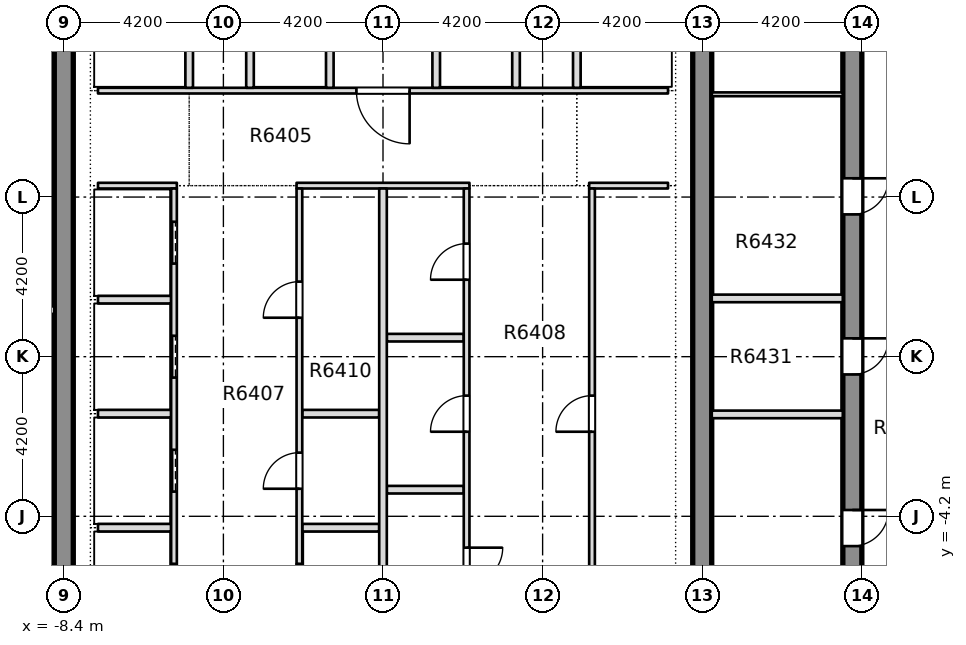
"""IFC4 building model, lengths in metres.
Left out: names, types, materials, properties, quantities, classifications, styles, units other than length and angle.
Written with IfcOpenShell. Run it as: python <this file> out.ifc"""

import sys

from ifc_helpers import new_model, si_unit, direction, frame, frame_2d, origin, place, context, subcontext, project, spatial, rectangle, extrude, element, fill, save


model = new_model("IFC4")
c1 = context("Model", 3, precision=1e-05, world=origin(), true_north=direction((0.0, 1.0)))
c2 = subcontext(c1, "Body", "Model", "MODEL_VIEW")
j1 = project(units=[si_unit("LENGTHUNIT", "METRE"), si_unit("PLANEANGLEUNIT", "RADIAN")], contexts=[c1])
p1 = place(None, origin())
s1 = spatial("IfcSite", under=j1, at=p1, CompositionType="ELEMENT")
p2 = place(p1, origin())
s2 = spatial("IfcBuilding", under=s1, at=p2, CompositionType="ELEMENT")
p3 = place(p2, frame((0.0, 0.0, 244.15)))
s3 = spatial("IfcBuildingStorey", under=s2, at=p3, CompositionType="ELEMENT", Elevation=244.15)
p4 = place(p3, frame((12.35, -8.4, -0.4), z_axis=(0.0, 0.0, 1.0), x_axis=(0.0, 1.0, 0.0)))
e1 = element("IfcWall", 1, at=p4, inside=s3, PredefinedType="SHEAR", context=c2, shape_type="SweptSolid", body=[
    extrude(rectangle(XDim=30.15, YDim=0.5, at=frame_2d((15.075, 0.0))), origin(), (0.0, 0.0, 1.0), 3.45),
])
p5 = place(p4, frame((3.416, 0.0, 0.4)))
e2 = element("IfcOpeningElement", 2, at=p5, cuts=e1, PredefinedType="OPENING", context=c2, shape_type="SweptSolid", body=[
    extrude(rectangle(XDim=0.95, YDim=2.1, at=frame_2d((0.475, 1.05))), frame((0.0, 0.26, 0.0), z_axis=(0.0, -1.0, 0.0), x_axis=(1.0, 0.0, 0.0)), (0.0, 0.0, 1.0), 0.52),
])
p6 = place(p4, frame((7.932, 0.0, 0.4)))
e3 = element("IfcOpeningElement", 3, at=p6, cuts=e1, PredefinedType="OPENING", context=c2, shape_type="SweptSolid", body=[
    extrude(rectangle(XDim=0.95, YDim=2.1, at=frame_2d((0.475, 1.05))), frame((0.0, 0.26, 0.0), z_axis=(0.0, -1.0, 0.0), x_axis=(1.0, 0.0, 0.0)), (0.0, 0.0, 1.0), 0.52),
])
p7 = place(p4, frame((12.144, 0.0, 0.4)))
e4 = element("IfcOpeningElement", 4, at=p7, cuts=e1, PredefinedType="OPENING", context=c2, shape_type="SweptSolid", body=[
    extrude(rectangle(XDim=0.95, YDim=2.1, at=frame_2d((0.475, 1.05))), frame((0.0, 0.26, 0.0), z_axis=(0.0, -1.0, 0.0), x_axis=(1.0, 0.0, 0.0)), (0.0, 0.0, 1.0), 0.52),
])
p8 = place(p4, frame((16.477, 0.0, 0.4)))
e5 = element("IfcOpeningElement", 5, at=p8, cuts=e1, PredefinedType="OPENING", context=c2, shape_type="SweptSolid", body=[
    extrude(rectangle(XDim=0.95, YDim=2.1, at=frame_2d((0.475, 1.05))), frame((0.0, 0.26, 0.0), z_axis=(0.0, -1.0, 0.0), x_axis=(1.0, 0.0, 0.0)), (0.0, 0.0, 1.0), 0.52),
])
p9 = place(p4, frame((23.605, 0.0, 0.4)))
e6 = element("IfcOpeningElement", 6, at=p9, cuts=e1, PredefinedType="OPENING", context=c2, shape_type="SweptSolid", body=[
    extrude(rectangle(XDim=0.95, YDim=2.1, at=frame_2d((0.475, 1.05))), frame((0.0, 0.26, 0.0), z_axis=(0.0, -1.0, 0.0), x_axis=(1.0, 0.0, 0.0)), (0.0, 0.0, 1.0), 0.52),
])
p10 = place(p4, frame((27.63, 0.0, 0.4)))
e7 = element("IfcOpeningElement", 7, at=p10, cuts=e1, PredefinedType="OPENING", context=c2, shape_type="SweptSolid", body=[
    extrude(rectangle(XDim=0.95, YDim=2.1, at=frame_2d((0.475, 1.05))), frame((0.0, 0.26, 0.0), z_axis=(0.0, -1.0, 0.0), x_axis=(1.0, 0.0, 0.0)), (0.0, 0.0, 1.0), 0.52),
])
p11 = place(p4, frame((19.3, 0.0, 0.4)))
e8 = element("IfcOpeningElement", 8, at=p11, cuts=e1, PredefinedType="OPENING", context=c2, shape_type="SweptSolid", body=[
    extrude(rectangle(XDim=1.2, YDim=2.1, at=frame_2d((0.6, 1.05))), frame((0.0, 0.26, 0.0), z_axis=(0.0, -1.0, 0.0), x_axis=(1.0, 0.0, 0.0)), (0.0, 0.0, 1.0), 0.52),
])
p12 = place(p3, frame((-8.4, -7.9, -0.4), z_axis=(0.0, 0.0, 1.0), x_axis=(0.0, 1.0, 0.0)))
e9 = element("IfcWall", 9, at=p12, inside=s3, PredefinedType="SHEAR", context=c2, shape_type="SweptSolid", body=[
    extrude(rectangle(XDim=29.15, YDim=0.5, at=frame_2d((14.575, 0.0))), origin(), (0.0, 0.0, 1.0), 3.45),
])
p13 = place(p12, frame((18.8, 0.0, 0.4)))
e10 = element("IfcOpeningElement", 10, at=p13, cuts=e9, PredefinedType="OPENING", context=c2, shape_type="SweptSolid", body=[
    extrude(rectangle(XDim=1.2, YDim=2.1, at=frame_2d((0.6, 1.05))), frame((0.0, 0.26, 0.0), z_axis=(0.0, -1.0, 0.0), x_axis=(1.0, 0.0, 0.0)), (0.0, 0.0, 1.0), 0.52),
])
p14 = place(p3, frame((8.4, -7.9, -0.4), z_axis=(0.0, 0.0, 1.0), x_axis=(0.0, 1.0, 0.0)))
e11 = element("IfcWall", 11, at=p14, inside=s3, PredefinedType="SHEAR", context=c2, shape_type="SweptSolid", body=[
    extrude(rectangle(XDim=29.15, YDim=0.5, at=frame_2d((14.575, 0.0))), origin(), (0.0, 0.0, 1.0), 3.45),
])
p15 = place(p14, frame((18.8, 0.0, 0.4)))
e12 = element("IfcOpeningElement", 12, at=p15, cuts=e11, PredefinedType="OPENING", context=c2, shape_type="SweptSolid", body=[
    extrude(rectangle(XDim=1.2, YDim=2.1, at=frame_2d((0.6, 1.05))), frame((0.0, 0.26, 0.0), z_axis=(0.0, -1.0, 0.0), x_axis=(1.0, 0.0, 0.0)), (0.0, 0.0, 1.0), 0.52),
])
p16 = place(p3, frame((-7.5, -4.5, 0.0), z_axis=(0.0, 0.0, 1.0), x_axis=(1.0, 0.0, 0.0)))
e13 = element("IfcWall", 13, at=p16, inside=s3, PredefinedType="PARTITIONING", context=c2, shape_type="SweptSolid", body=[
    extrude(rectangle(XDim=1.925, YDim=0.2, at=frame_2d((0.962, 0.0))), origin(), (0.0, 0.0, 1.0), 3.05),
])
for number, where, z_axis, x_axis in (
    (14, (-2.125, -4.5, 0.0), (0.0, 0.0, 1.0), (1.0, 0.0, 0.0)),
    (15, (0.1, -3.5, 0.0), (0.0, 0.0, 1.0), (1.0, 0.0, 0.0)),
):
    element("IfcWall", number, at=place(p3, frame(where, z_axis=z_axis, x_axis=x_axis)), inside=s3, PredefinedType="PARTITIONING", context=c2, shape_type="SweptSolid", body=[
        extrude(rectangle(XDim=2.025, YDim=0.2, at=frame_2d((1.012, 0.0))), origin(), (0.0, 0.0, 1.0), 3.05),
    ])
p17 = place(p3, frame((-7.5, -1.5, 0.0), z_axis=(0.0, 0.0, 1.0), x_axis=(1.0, 0.0, 0.0)))
e16 = element("IfcWall", 16, at=p17, inside=s3, PredefinedType="PARTITIONING", context=c2, shape_type="SweptSolid", body=[
    extrude(rectangle(XDim=1.925, YDim=0.2, at=frame_2d((0.962, 0.0))), origin(), (0.0, 0.0, 1.0), 3.05),
])
for number, where, z_axis, x_axis in (
    (17, (-2.125, -1.5, 0.0), (0.0, 0.0, 1.0), (1.0, 0.0, 0.0)),
    (18, (0.1, 0.5, 0.0), (0.0, 0.0, 1.0), (1.0, 0.0, 0.0)),
):
    element("IfcWall", number, at=place(p3, frame(where, z_axis=z_axis, x_axis=x_axis)), inside=s3, PredefinedType="PARTITIONING", context=c2, shape_type="SweptSolid", body=[
        extrude(rectangle(XDim=2.025, YDim=0.2, at=frame_2d((1.012, 0.0))), origin(), (0.0, 0.0, 1.0), 3.05),
    ])
p18 = place(p3, frame((-7.5, 1.5, 0.0), z_axis=(0.0, 0.0, 1.0), x_axis=(1.0, 0.0, 0.0)))
e19 = element("IfcWall", 19, at=p18, inside=s3, PredefinedType="PARTITIONING", context=c2, shape_type="SweptSolid", body=[
    extrude(rectangle(XDim=1.925, YDim=0.2, at=frame_2d((0.962, 0.0))), origin(), (0.0, 0.0, 1.0), 3.05),
])
p19 = place(p3, frame((-7.5, 4.5, 0.0), z_axis=(0.0, 0.0, 1.0), x_axis=(1.0, 0.0, 0.0)))
e20 = element("IfcWall", 20, at=p19, inside=s3, PredefinedType="PARTITIONING", context=c2, shape_type="SweptSolid", body=[
    extrude(rectangle(XDim=2.075, YDim=0.15, at=frame_2d((1.038, 0.0))), origin(), (0.0, 0.0, 1.0), 3.05),
])
p20 = place(p3, frame((-2.275, 4.5, 0.0), z_axis=(0.0, 0.0, 1.0), x_axis=(1.0, 0.0, 0.0)))
e21 = element("IfcWall", 21, at=p20, inside=s3, PredefinedType="PARTITIONING", context=c2, shape_type="SweptSolid", body=[
    extrude(rectangle(XDim=4.55, YDim=0.15, at=frame_2d((2.275, 0.0))), origin(), (0.0, 0.0, 1.0), 3.05),
])
p21 = place(p3, frame((5.425, 4.5, 0.0), z_axis=(0.0, 0.0, 1.0), x_axis=(1.0, 0.0, 0.0)))
e22 = element("IfcWall", 22, at=p21, inside=s3, PredefinedType="PARTITIONING", context=c2, shape_type="SweptSolid", body=[
    extrude(rectangle(XDim=2.075, YDim=0.15, at=frame_2d((1.038, 0.0))), origin(), (0.0, 0.0, 1.0), 3.05),
])
p22 = place(p3, frame((-7.5, 7.0, 0.0), z_axis=(0.0, 0.0, 1.0), x_axis=(1.0, 0.0, 0.0)))
e23 = element("IfcWall", 23, at=p22, inside=s3, PredefinedType="PARTITIONING", context=c2, shape_type="SweptSolid", body=[
    extrude(rectangle(XDim=15.0, YDim=0.15, at=frame_2d((7.5, 0.0))), origin(), (0.0, 0.0, 1.0), 3.05),
])
p23 = place(p22, frame((6.8, 0.0, 0.0)))
e24 = element("IfcOpeningElement", 24, at=p23, cuts=e23, PredefinedType="OPENING", context=c2, shape_type="SweptSolid", body=[
    extrude(rectangle(XDim=1.4, YDim=2.1, at=frame_2d((0.7, 1.05))), frame((0.0, 0.085, 0.0), z_axis=(0.0, -1.0, 0.0), x_axis=(1.0, 0.0, 0.0)), (0.0, 0.0, 1.0), 0.17),
])
p24 = place(p3, frame((-5.5, -7.899, 0.0), z_axis=(0.0, 0.0, 1.0), x_axis=(0.0, 1.0, 0.0)))
e25 = element("IfcWall", 25, at=p24, inside=s3, PredefinedType="PARTITIONING", context=c2, shape_type="SweptSolid", body=[
    extrude(rectangle(XDim=12.324, YDim=0.15, at=frame_2d((6.162, 0.0))), origin(), (0.0, 0.0, 1.0), 3.05),
])
p25 = place(p24, frame((1.349, 0.0, 0.0)))
e26 = element("IfcOpeningElement", 26, at=p25, cuts=e25, PredefinedType="OPENING", context=c2, shape_type="SweptSolid", body=[
    extrude(rectangle(XDim=1.1, YDim=2.1, at=frame_2d((0.55, 1.05))), frame((0.0, 0.085, 0.0), z_axis=(0.0, -1.0, 0.0), x_axis=(1.0, 0.0, 0.0)), (0.0, 0.0, 1.0), 0.17),
])
p26 = place(p24, frame((4.349, 0.0, 0.0)))
e27 = element("IfcOpeningElement", 27, at=p26, cuts=e25, PredefinedType="OPENING", context=c2, shape_type="SweptSolid", body=[
    extrude(rectangle(XDim=1.1, YDim=2.1, at=frame_2d((0.55, 1.05))), frame((0.0, 0.085, 0.0), z_axis=(0.0, -1.0, 0.0), x_axis=(1.0, 0.0, 0.0)), (0.0, 0.0, 1.0), 0.17),
])
p27 = place(p24, frame((7.349, 0.0, 0.0)))
e28 = element("IfcOpeningElement", 28, at=p27, cuts=e25, PredefinedType="OPENING", context=c2, shape_type="SweptSolid", body=[
    extrude(rectangle(XDim=1.1, YDim=2.1, at=frame_2d((0.55, 1.05))), frame((0.0, 0.085, 0.0), z_axis=(0.0, -1.0, 0.0), x_axis=(1.0, 0.0, 0.0)), (0.0, 0.0, 1.0), 0.17),
])
p28 = place(p24, frame((10.349, 0.0, 0.0)))
e29 = element("IfcOpeningElement", 29, at=p28, cuts=e25, PredefinedType="OPENING", context=c2, shape_type="SweptSolid", body=[
    extrude(rectangle(XDim=1.1, YDim=2.1, at=frame_2d((0.55, 1.05))), frame((0.0, 0.085, 0.0), z_axis=(0.0, -1.0, 0.0), x_axis=(1.0, 0.0, 0.0)), (0.0, 0.0, 1.0), 0.17),
])
p29 = place(p3, frame((-5.1, 7.075, 0.0), z_axis=(0.0, 0.0, 1.0), x_axis=(0.0, 1.0, 0.0)))
e30 = element("IfcWall", 30, at=p29, inside=s3, PredefinedType="PARTITIONING", context=c2, shape_type="SweptSolid", body=[
    extrude(rectangle(XDim=2.725, YDim=0.2, at=frame_2d((1.363, 0.0))), origin(), (0.0, 0.0, 1.0), 3.05),
])
p30 = place(p3, frame((-3.5, 7.075, 0.0), z_axis=(0.0, 0.0, 1.0), x_axis=(0.0, 1.0, 0.0)))
e31 = element("IfcWall", 31, at=p30, inside=s3, PredefinedType="PARTITIONING", context=c2, shape_type="SweptSolid", body=[
    extrude(rectangle(XDim=2.85, YDim=0.2, at=frame_2d((1.425, 0.0))), origin(), (0.0, 0.0, 1.0), 3.05),
])
p31 = place(p3, frame((-2.2, -7.899, 0.0), z_axis=(0.0, 0.0, 1.0), x_axis=(0.0, 1.0, 0.0)))
e32 = element("IfcWall", 32, at=p31, inside=s3, PredefinedType="PARTITIONING", context=c2, shape_type="SweptSolid", body=[
    extrude(rectangle(XDim=12.324, YDim=0.15, at=frame_2d((6.162, 0.0))), origin(), (0.0, 0.0, 1.0), 3.05),
])
p32 = place(p31, frame((1.349, 0.0, 0.0)))
e33 = element("IfcOpeningElement", 33, at=p32, cuts=e32, PredefinedType="OPENING", context=c2, shape_type="SweptSolid", body=[
    extrude(rectangle(XDim=1.1, YDim=2.1, at=frame_2d((0.55, 1.05))), frame((0.0, 0.085, 0.0), z_axis=(0.0, -1.0, 0.0), x_axis=(1.0, 0.0, 0.0)), (0.0, 0.0, 1.0), 0.17),
])
p33 = place(p31, frame((4.424, 0.0, 0.0)))
e34 = element("IfcOpeningElement", 34, at=p33, cuts=e32, PredefinedType="OPENING", context=c2, shape_type="SweptSolid", body=[
    extrude(rectangle(XDim=0.95, YDim=2.1, at=frame_2d((0.475, 1.05))), frame((0.0, 0.085, 0.0), z_axis=(0.0, -1.0, 0.0), x_axis=(1.0, 0.0, 0.0)), (0.0, 0.0, 1.0), 0.17),
])
p34 = place(p31, frame((8.924, 0.0, 0.0)))
e35 = element("IfcOpeningElement", 35, at=p34, cuts=e32, PredefinedType="OPENING", context=c2, shape_type="SweptSolid", body=[
    extrude(rectangle(XDim=0.95, YDim=2.1, at=frame_2d((0.475, 1.05))), frame((0.0, 0.085, 0.0), z_axis=(0.0, -1.0, 0.0), x_axis=(1.0, 0.0, 0.0)), (0.0, 0.0, 1.0), 0.17),
])
p35 = place(p3, frame((-1.4, 7.075, 0.0), z_axis=(0.0, 0.0, 1.0), x_axis=(0.0, 1.0, 0.0)))
e36 = element("IfcWall", 36, at=p35, inside=s3, PredefinedType="PARTITIONING", context=c2, shape_type="SweptSolid", body=[
    extrude(rectangle(XDim=2.85, YDim=0.2, at=frame_2d((1.425, 0.0))), origin(), (0.0, 0.0, 1.0), 3.05),
])
p36 = place(p3, frame((0.0, -7.899, 0.0), z_axis=(0.0, 0.0, 1.0), x_axis=(0.0, 1.0, 0.0)))
e37 = element("IfcWall", 37, at=p36, inside=s3, PredefinedType="PARTITIONING", context=c2, shape_type="SweptSolid", body=[
    extrude(rectangle(XDim=12.324, YDim=0.2, at=frame_2d((6.162, 0.0))), origin(), (0.0, 0.0, 1.0), 3.05),
])
p37 = place(p3, frame((1.4, 7.075, 0.0), z_axis=(0.0, 0.0, 1.0), x_axis=(0.0, 1.0, 0.0)))
e38 = element("IfcWall", 38, at=p37, inside=s3, PredefinedType="PARTITIONING", context=c2, shape_type="SweptSolid", body=[
    extrude(rectangle(XDim=2.85, YDim=0.2, at=frame_2d((1.425, 0.0))), origin(), (0.0, 0.0, 1.0), 3.05),
])
p38 = place(p3, frame((2.2, -7.899, 0.0), z_axis=(0.0, 0.0, 1.0), x_axis=(0.0, 1.0, 0.0)))
e39 = element("IfcWall", 39, at=p38, inside=s3, PredefinedType="PARTITIONING", context=c2, shape_type="SweptSolid", body=[
    extrude(rectangle(XDim=12.324, YDim=0.15, at=frame_2d((6.162, 0.0))), origin(), (0.0, 0.0, 1.0), 3.05),
])
p39 = place(p38, frame((1.924, 0.0, 0.0)))
e40 = element("IfcOpeningElement", 40, at=p39, cuts=e39, PredefinedType="OPENING", context=c2, shape_type="SweptSolid", body=[
    extrude(rectangle(XDim=0.95, YDim=2.1, at=frame_2d((0.475, 1.05))), frame((0.0, 0.085, 0.0), z_axis=(0.0, -1.0, 0.0), x_axis=(1.0, 0.0, 0.0)), (0.0, 0.0, 1.0), 0.17),
])
p40 = place(p38, frame((5.924, 0.0, 0.0)))
e41 = element("IfcOpeningElement", 41, at=p40, cuts=e39, PredefinedType="OPENING", context=c2, shape_type="SweptSolid", body=[
    extrude(rectangle(XDim=0.95, YDim=2.1, at=frame_2d((0.475, 1.05))), frame((0.0, 0.085, 0.0), z_axis=(0.0, -1.0, 0.0), x_axis=(1.0, 0.0, 0.0)), (0.0, 0.0, 1.0), 0.17),
])
p41 = place(p38, frame((9.924, 0.0, 0.0)))
e42 = element("IfcOpeningElement", 42, at=p41, cuts=e39, PredefinedType="OPENING", context=c2, shape_type="SweptSolid", body=[
    extrude(rectangle(XDim=0.95, YDim=2.1, at=frame_2d((0.475, 1.05))), frame((0.0, 0.085, 0.0), z_axis=(0.0, -1.0, 0.0), x_axis=(1.0, 0.0, 0.0)), (0.0, 0.0, 1.0), 0.17),
])
p42 = place(p3, frame((3.5, 7.075, 0.0), z_axis=(0.0, 0.0, 1.0), x_axis=(0.0, 1.0, 0.0)))
e43 = element("IfcWall", 43, at=p42, inside=s3, PredefinedType="PARTITIONING", context=c2, shape_type="SweptSolid", body=[
    extrude(rectangle(XDim=2.85, YDim=0.2, at=frame_2d((1.425, 0.0))), origin(), (0.0, 0.0, 1.0), 3.05),
])
p43 = place(p3, frame((5.1, 7.075, 0.0), z_axis=(0.0, 0.0, 1.0), x_axis=(0.0, 1.0, 0.0)))
e44 = element("IfcWall", 44, at=p43, inside=s3, PredefinedType="PARTITIONING", context=c2, shape_type="SweptSolid", body=[
    extrude(rectangle(XDim=2.725, YDim=0.2, at=frame_2d((1.363, 0.0))), origin(), (0.0, 0.0, 1.0), 3.05),
])
p44 = place(p3, frame((5.5, -7.899, 0.0), z_axis=(0.0, 0.0, 1.0), x_axis=(0.0, 1.0, 0.0)))
e45 = element("IfcWall", 45, at=p44, inside=s3, PredefinedType="PARTITIONING", context=c2, shape_type="SweptSolid", body=[
    extrude(rectangle(XDim=12.324, YDim=0.15, at=frame_2d((6.162, 0.0))), origin(), (0.0, 0.0, 1.0), 3.05),
])
p45 = place(p44, frame((5.924, 0.0, 0.0)))
e46 = element("IfcOpeningElement", 46, at=p45, cuts=e45, PredefinedType="OPENING", context=c2, shape_type="SweptSolid", body=[
    extrude(rectangle(XDim=0.95, YDim=2.1, at=frame_2d((0.475, 1.05))), frame((0.0, 0.085, 0.0), z_axis=(0.0, -1.0, 0.0), x_axis=(1.0, 0.0, 0.0)), (0.0, 0.0, 1.0), 0.17),
])
for number, where, z_axis, x_axis in (
    (47, (-12.099, 1.225, 0.0), (0.0, 0.0, 1.0), (1.0, 0.0, 0.0)),
    (48, (8.651, -1.519, 0.0), (0.0, 0.0, 1.0), (1.0, 0.0, 0.0)),
    (49, (8.651, 1.533, 0.0), (0.0, 0.0, 1.0), (1.0, 0.0, 0.0)),
):
    element("IfcWall", number, at=place(p3, frame(where, z_axis=z_axis, x_axis=x_axis)), inside=s3, PredefinedType="PARTITIONING", context=c2, shape_type="SweptSolid", body=[
        extrude(rectangle(XDim=3.448, YDim=0.2, at=frame_2d((1.724, 0.0))), origin(), (0.0, 0.0, 1.0), 3.05),
    ])
p46 = place(p3, frame((8.651, 6.904, 0.0), z_axis=(0.0, 0.0, 1.0), x_axis=(1.0, 0.0, 0.0)))
e50 = element("IfcWall", 50, at=p46, inside=s3, PredefinedType="PARTITIONING", context=c2, shape_type="SweptSolid", body=[
    extrude(rectangle(XDim=3.448, YDim=0.1, at=frame_2d((1.724, 0.0))), origin(), (0.0, 0.0, 1.0), 3.05),
])
p47 = place(p25, origin())
e51 = element("IfcDoor", 51, at=p47, inside=s3, OperationType="SLIDING_TO_LEFT", PredefinedType="DOOR", context=c2, shape_type="SweptSolid", body=[
    extrude(rectangle(XDim=1.1, YDim=2.1, at=frame_2d((0.55, 1.05))), frame((0.0, 0.025, 0.0), z_axis=(0.0, -1.0, 0.0), x_axis=(1.0, 0.0, 0.0)), (0.0, 0.0, 1.0), 0.05),
])
fill(e26, e51)
p48 = place(p26, origin())
e52 = element("IfcDoor", 52, at=p48, inside=s3, OperationType="SLIDING_TO_LEFT", PredefinedType="DOOR", context=c2, shape_type="SweptSolid", body=[
    extrude(rectangle(XDim=1.1, YDim=2.1, at=frame_2d((0.55, 1.05))), frame((0.0, 0.025, 0.0), z_axis=(0.0, -1.0, 0.0), x_axis=(1.0, 0.0, 0.0)), (0.0, 0.0, 1.0), 0.05),
])
fill(e27, e52)
p49 = place(p27, origin())
e53 = element("IfcDoor", 53, at=p49, inside=s3, OperationType="SLIDING_TO_LEFT", PredefinedType="DOOR", context=c2, shape_type="SweptSolid", body=[
    extrude(rectangle(XDim=1.1, YDim=2.1, at=frame_2d((0.55, 1.05))), frame((0.0, 0.025, 0.0), z_axis=(0.0, -1.0, 0.0), x_axis=(1.0, 0.0, 0.0)), (0.0, 0.0, 1.0), 0.05),
])
fill(e28, e53)
p50 = place(p28, origin())
e54 = element("IfcDoor", 54, at=p50, inside=s3, OperationType="SLIDING_TO_LEFT", PredefinedType="DOOR", context=c2, shape_type="SweptSolid", body=[
    extrude(rectangle(XDim=1.1, YDim=2.1, at=frame_2d((0.55, 1.05))), frame((0.0, 0.025, 0.0), z_axis=(0.0, -1.0, 0.0), x_axis=(1.0, 0.0, 0.0)), (0.0, 0.0, 1.0), 0.05),
])
fill(e29, e54)
p51 = place(p32, origin())
e55 = element("IfcDoor", 55, at=p51, inside=s3, OperationType="SLIDING_TO_LEFT", PredefinedType="DOOR", context=c2, shape_type="SweptSolid", body=[
    extrude(rectangle(XDim=1.1, YDim=2.1, at=frame_2d((0.55, 1.05))), frame((0.0, 0.025, 0.0), z_axis=(0.0, -1.0, 0.0), x_axis=(1.0, 0.0, 0.0)), (0.0, 0.0, 1.0), 0.05),
])
fill(e33, e55)
p52 = place(p33, origin())
e56 = element("IfcDoor", 56, at=p52, inside=s3, OperationType="SINGLE_SWING_RIGHT", PredefinedType="DOOR", context=c2, shape_type="SweptSolid", body=[
    extrude(rectangle(XDim=0.95, YDim=2.1, at=frame_2d((0.475, 1.05))), frame((0.0, 0.025, 0.0), z_axis=(0.0, -1.0, 0.0), x_axis=(1.0, 0.0, 0.0)), (0.0, 0.0, 1.0), 0.05),
])
fill(e34, e56)
p53 = place(p34, origin())
e57 = element("IfcDoor", 57, at=p53, inside=s3, OperationType="SINGLE_SWING_LEFT", PredefinedType="DOOR", context=c2, shape_type="SweptSolid", body=[
    extrude(rectangle(XDim=0.95, YDim=2.1, at=frame_2d((0.475, 1.05))), frame((0.0, 0.025, 0.0), z_axis=(0.0, -1.0, 0.0), x_axis=(1.0, 0.0, 0.0)), (0.0, 0.0, 1.0), 0.05),
])
fill(e35, e57)
p54 = place(p39, origin())
e58 = element("IfcDoor", 58, at=p54, inside=s3, OperationType="SINGLE_SWING_RIGHT", PredefinedType="DOOR", context=c2, shape_type="SweptSolid", body=[
    extrude(rectangle(XDim=0.95, YDim=2.1, at=frame_2d((0.475, 1.05))), frame((0.0, 0.025, 0.0), z_axis=(0.0, -1.0, 0.0), x_axis=(1.0, 0.0, 0.0)), (0.0, 0.0, 1.0), 0.05),
])
fill(e40, e58)
p55 = place(p40, origin())
e59 = element("IfcDoor", 59, at=p55, inside=s3, OperationType="SINGLE_SWING_RIGHT", PredefinedType="DOOR", context=c2, shape_type="SweptSolid", body=[
    extrude(rectangle(XDim=0.95, YDim=2.1, at=frame_2d((0.475, 1.05))), frame((0.0, 0.025, 0.0), z_axis=(0.0, -1.0, 0.0), x_axis=(1.0, 0.0, 0.0)), (0.0, 0.0, 1.0), 0.05),
])
fill(e41, e59)
p56 = place(p41, origin())
e60 = element("IfcDoor", 60, at=p56, inside=s3, OperationType="SINGLE_SWING_LEFT", PredefinedType="DOOR", context=c2, shape_type="SweptSolid", body=[
    extrude(rectangle(XDim=0.95, YDim=2.1, at=frame_2d((0.475, 1.05))), frame((0.0, 0.025, 0.0), z_axis=(0.0, -1.0, 0.0), x_axis=(1.0, 0.0, 0.0)), (0.0, 0.0, 1.0), 0.05),
])
fill(e42, e60)
p57 = place(p45, origin())
e61 = element("IfcDoor", 61, at=p57, inside=s3, OperationType="SINGLE_SWING_LEFT", PredefinedType="DOOR", context=c2, shape_type="SweptSolid", body=[
    extrude(rectangle(XDim=0.95, YDim=2.1, at=frame_2d((0.475, 1.05))), frame((0.0, 0.025, 0.0), z_axis=(0.0, -1.0, 0.0), x_axis=(1.0, 0.0, 0.0)), (0.0, 0.0, 1.0), 0.05),
])
fill(e46, e61)
p58 = place(p23, origin())
e62 = element("IfcDoor", 62, at=p58, inside=s3, OperationType="SINGLE_SWING_RIGHT", PredefinedType="DOOR", context=c2, shape_type="SweptSolid", body=[
    extrude(rectangle(XDim=1.4, YDim=2.1, at=frame_2d((0.7, 1.05))), frame((0.0, 0.025, 0.0), z_axis=(0.0, -1.0, 0.0), x_axis=(1.0, 0.0, 0.0)), (0.0, 0.0, 1.0), 0.05),
])
fill(e24, e62)
p59 = place(p5, origin())
e63 = element("IfcDoor", 63, at=p59, inside=s3, OperationType="SINGLE_SWING_LEFT", PredefinedType="DOOR", context=c2, shape_type="SweptSolid", body=[
    extrude(rectangle(XDim=0.95, YDim=2.1, at=frame_2d((0.475, 1.05))), frame((0.0, 0.025, 0.0), z_axis=(0.0, -1.0, 0.0), x_axis=(1.0, 0.0, 0.0)), (0.0, 0.0, 1.0), 0.05),
])
fill(e2, e63)
p60 = place(p6, origin())
e64 = element("IfcDoor", 64, at=p60, inside=s3, OperationType="SINGLE_SWING_LEFT", PredefinedType="DOOR", context=c2, shape_type="SweptSolid", body=[
    extrude(rectangle(XDim=0.95, YDim=2.1, at=frame_2d((0.475, 1.05))), frame((0.0, 0.025, 0.0), z_axis=(0.0, -1.0, 0.0), x_axis=(1.0, 0.0, 0.0)), (0.0, 0.0, 1.0), 0.05),
])
fill(e3, e64)
p61 = place(p7, origin())
e65 = element("IfcDoor", 65, at=p61, inside=s3, OperationType="SINGLE_SWING_LEFT", PredefinedType="DOOR", context=c2, shape_type="SweptSolid", body=[
    extrude(rectangle(XDim=0.95, YDim=2.1, at=frame_2d((0.475, 1.05))), frame((0.0, 0.025, 0.0), z_axis=(0.0, -1.0, 0.0), x_axis=(1.0, 0.0, 0.0)), (0.0, 0.0, 1.0), 0.05),
])
fill(e4, e65)
save(model, sys.argv[1])
